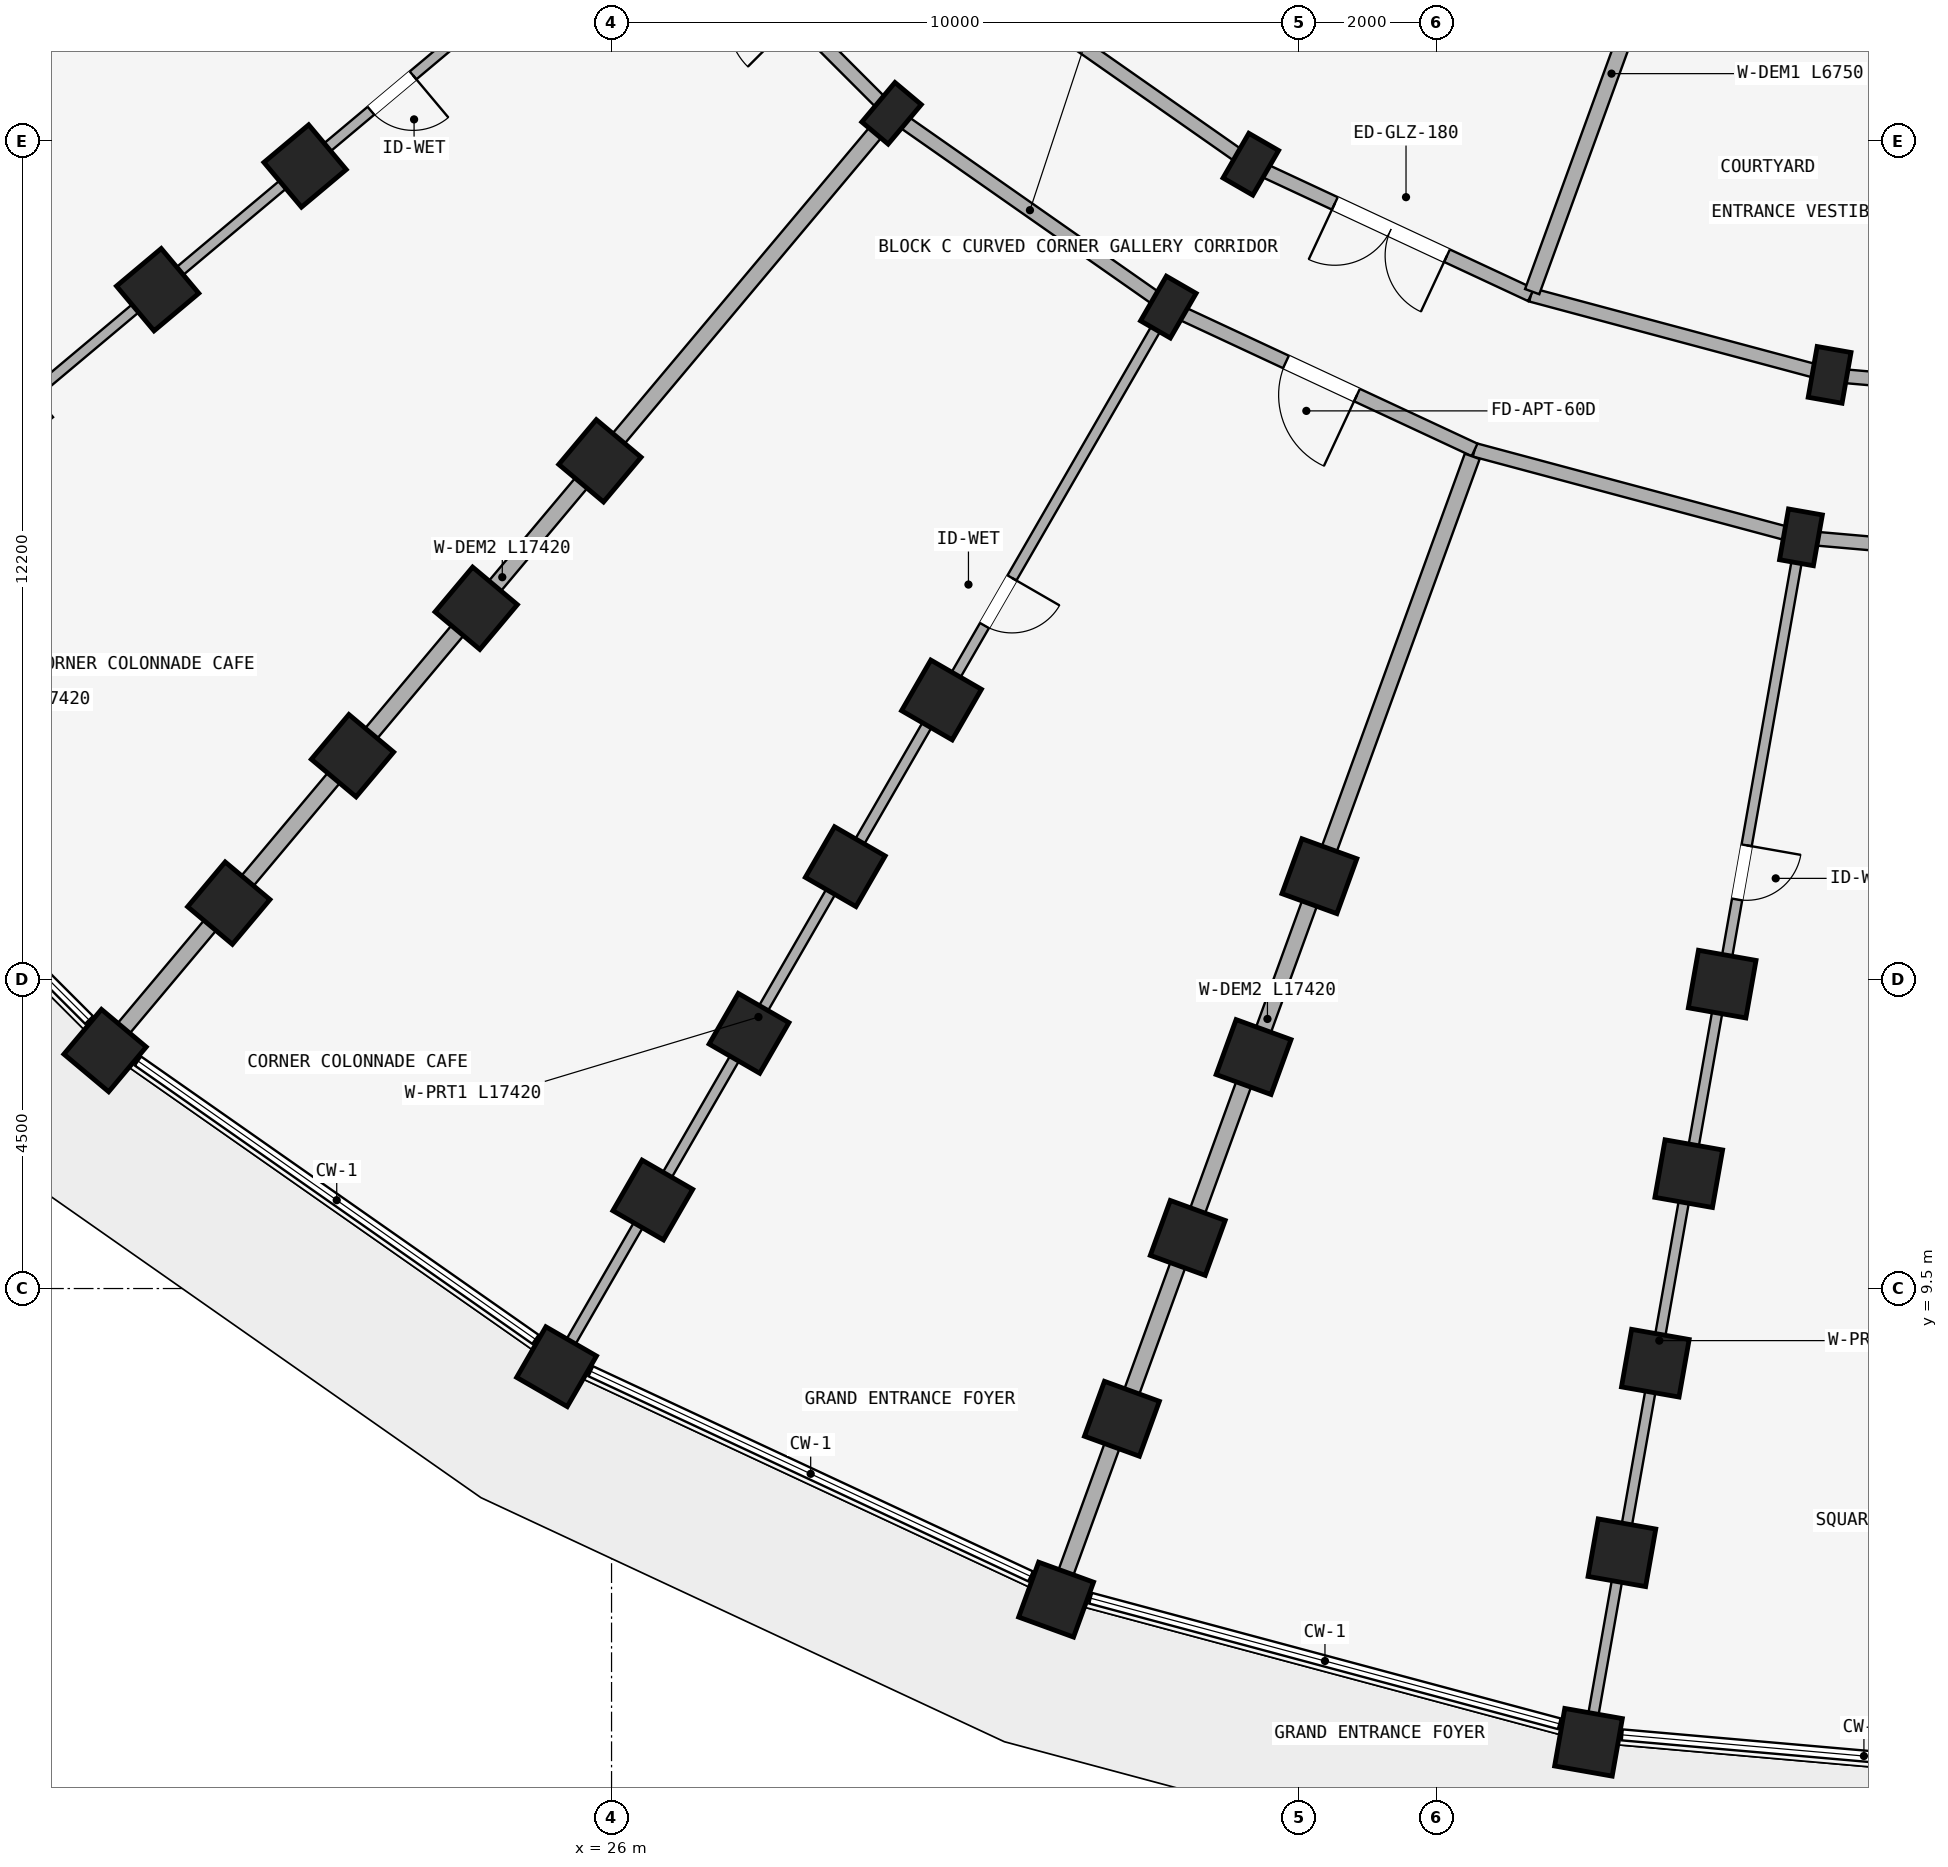
"""IFC4 building model, lengths in metres.
Left out: names, types, materials, properties, quantities, classifications, styles, units other than length and angle.
Written with IfcOpenShell. Run it as: python <this file> out.ifc"""

import sys

from ifc_helpers import new_model, si_unit, direction, frame, frame_2d, origin, origin_2d, place, context, subcontext, project, spatial, rectangle, extrude, element, fill, save


model = new_model("IFC4")
c1 = context("Model", 3, precision=1e-05, world=origin(), true_north=direction((0.0, 1.0)))
c2 = subcontext(c1, "Body", "Model", "MODEL_VIEW")
j1 = project(units=[si_unit("LENGTHUNIT", "METRE"), si_unit("PLANEANGLEUNIT", "RADIAN")], contexts=[c1])
p1 = place(None, origin())
s1 = spatial("IfcSite", under=j1, at=p1, CompositionType="ELEMENT")
p2 = place(p1, origin())
s2 = spatial("IfcBuilding", under=s1, at=p2, CompositionType="ELEMENT")
p3 = place(p2, origin())
s3 = spatial("IfcBuildingStorey", under=s2, at=p3, CompositionType="ELEMENT", Elevation=0.0)
for number, where, z_axis, x_axis in (
    (1, (43.72, 22.792, 0.0), (0.0, 0.0, 1.0), (-0.985, 0.174, 0.0)),
    (2, (43.303, 20.428, 0.0), (0.0, 0.0, 1.0), (-0.985, 0.174, 0.0)),
):
    element("IfcColumn", number, at=place(p3, frame(where, z_axis=z_axis, x_axis=x_axis)), inside=s3, PredefinedType="COLUMN", context=c2, shape_type="SweptSolid", body=[
        extrude(rectangle(XDim=0.5, YDim=0.75, at=origin_2d()), origin(), (0.0, 0.0, 1.0), 4.15),
    ])
for number, where, z_axis, x_axis in (
    (3, (42.157, 13.929, 0.0), (0.0, 0.0, 1.0), (-0.985, 0.174, 0.0)),
    (4, (41.671, 11.171, 0.0), (0.0, 0.0, 1.0), (-0.985, 0.174, 0.0)),
    (5, (41.185, 8.414, 0.0), (0.0, 0.0, 1.0), (-0.985, 0.174, 0.0)),
    (6, (40.698, 5.656, 0.0), (0.0, 0.0, 1.0), (-0.985, 0.174, 0.0)),
    (7, (40.212, 2.899, 0.0), (0.0, 0.0, 1.0), (-0.985, 0.174, 0.0)),
    (8, (36.298, 15.499, 0.0), (0.0, 0.0, 1.0), (-0.94, 0.342, 0.0)),
    (9, (35.34, 12.868, 0.0), (0.0, 0.0, 1.0), (-0.94, 0.342, 0.0)),
    (10, (34.382, 10.236, 0.0), (0.0, 0.0, 1.0), (-0.94, 0.342, 0.0)),
    (11, (33.425, 7.605, 0.0), (0.0, 0.0, 1.0), (-0.94, 0.342, 0.0)),
    (12, (32.467, 4.974, 0.0), (0.0, 0.0, 1.0), (-0.94, 0.342, 0.0)),
):
    element("IfcColumn", number, at=place(p3, frame(where, z_axis=z_axis, x_axis=x_axis)), inside=s3, PredefinedType="COLUMN", context=c2, shape_type="SweptSolid", body=[
        extrude(rectangle(XDim=0.85, YDim=0.85, at=origin_2d()), origin(), (0.0, 0.0, 1.0), 4.15),
    ])
for number, where, z_axis, x_axis in (
    (13, (35.3, 25.856, 0.0), (0.0, 0.0, 1.0), (-0.866, 0.5, 0.0)),
    (14, (34.1, 23.778, 0.0), (0.0, 0.0, 1.0), (-0.866, 0.5, 0.0)),
):
    element("IfcColumn", number, at=place(p3, frame(where, z_axis=z_axis, x_axis=x_axis)), inside=s3, PredefinedType="COLUMN", context=c2, shape_type="SweptSolid", body=[
        extrude(rectangle(XDim=0.5, YDim=0.75, at=origin_2d()), origin(), (0.0, 0.0, 1.0), 4.15),
    ])
for number, where, z_axis, x_axis in (
    (15, (30.8, 18.062, 0.0), (0.0, 0.0, 1.0), (-0.866, 0.5, 0.0)),
    (16, (29.4, 15.637, 0.0), (0.0, 0.0, 1.0), (-0.866, 0.5, 0.0)),
    (17, (28.0, 13.213, 0.0), (0.0, 0.0, 1.0), (-0.866, 0.5, 0.0)),
    (18, (26.6, 10.788, 0.0), (0.0, 0.0, 1.0), (-0.866, 0.5, 0.0)),
    (19, (25.2, 8.363, 0.0), (0.0, 0.0, 1.0), (-0.866, 0.5, 0.0)),
):
    element("IfcColumn", number, at=place(p3, frame(where, z_axis=z_axis, x_axis=x_axis)), inside=s3, PredefinedType="COLUMN", context=c2, shape_type="SweptSolid", body=[
        extrude(rectangle(XDim=0.85, YDim=0.85, at=origin_2d()), origin(), (0.0, 0.0, 1.0), 4.15),
    ])
p4 = place(p3, frame((30.073, 26.598, 0.0), z_axis=(0.0, 0.0, 1.0), x_axis=(-0.766044443119, 0.642787609687, 0.0)))
e20 = element("IfcColumn", 20, at=p4, inside=s3, PredefinedType="COLUMN", context=c2, shape_type="SweptSolid", body=[
    extrude(rectangle(XDim=0.5, YDim=0.75, at=origin_2d()), origin(), (0.0, 0.0, 1.0), 4.15),
])
for number, where, z_axis, x_axis in (
    (21, (25.831, 21.542, 0.0), (0.0, 0.0, 1.0), (-0.766, 0.643, 0.0)),
    (22, (24.031, 19.397, 0.0), (0.0, 0.0, 1.0), (-0.766, 0.643, 0.0)),
    (23, (22.231, 17.252, 0.0), (0.0, 0.0, 1.0), (-0.766, 0.643, 0.0)),
    (24, (20.432, 15.107, 0.0), (0.0, 0.0, 1.0), (-0.766, 0.643, 0.0)),
    (25, (18.632, 12.962, 0.0), (0.0, 0.0, 1.0), (-0.766, 0.643, 0.0)),
    (26, (21.542, 25.831, 0.0), (0.0, 0.0, 1.0), (-0.643, 0.766, 0.0)),
    (27, (19.397, 24.031, 0.0), (0.0, 0.0, 1.0), (-0.643, 0.766, 0.0)),
):
    element("IfcColumn", number, at=place(p3, frame(where, z_axis=z_axis, x_axis=x_axis)), inside=s3, PredefinedType="COLUMN", context=c2, shape_type="SweptSolid", body=[
        extrude(rectangle(XDim=0.85, YDim=0.85, at=origin_2d()), origin(), (0.0, 0.0, 1.0), 4.15),
    ])
p5 = place(p3, frame((48.2, 22.4, 0.0), z_axis=(0.0, 0.0, 1.0), x_axis=(-0.996191949488, 0.087187153726, 0.0)))
e28 = element("IfcWall", 28, at=p5, inside=s3, PredefinedType="STANDARD", context=c2, shape_type="SweptSolid", body=[
    extrude(rectangle(XDim=4.497, YDim=0.2, at=frame_2d((2.249, 0.0))), origin(), (0.0, 0.0, 1.0), 3.492),
])
p6 = place(p5, frame((1.729, 0.0, 0.0)))
e29 = element("IfcOpeningElement", 29, at=p6, cuts=e28, PredefinedType="OPENING", context=c2, shape_type="SweptSolid", body=[
    extrude(rectangle(XDim=1.04, YDim=2.15, at=frame_2d((0.52, 1.075))), frame((0.0, 0.11, 0.0), z_axis=(0.0, -1.0, 0.0), x_axis=(1.0, 0.0, 0.0)), (0.0, 0.0, 1.0), 0.22),
])
p7 = place(p3, frame((48.2, 20.0, 0.0), z_axis=(0.0, 0.0, 1.0), x_axis=(-0.996193663584, 0.087167566415, 0.0)))
e30 = element("IfcWall", 30, at=p7, inside=s3, PredefinedType="STANDARD", context=c2, shape_type="SweptSolid", body=[
    extrude(rectangle(XDim=4.916, YDim=0.2, at=frame_2d((2.458, 0.0))), origin(), (0.0, 0.0, 1.0), 3.492),
])
p8 = place(p7, frame((1.918, 0.0, 0.0)))
e31 = element("IfcOpeningElement", 31, at=p8, cuts=e30, PredefinedType="OPENING", context=c2, shape_type="SweptSolid", body=[
    extrude(rectangle(XDim=1.08, YDim=2.15, at=frame_2d((0.54, 1.075))), frame((0.0, 0.11, 0.0), z_axis=(0.0, -1.0, 0.0), x_axis=(1.0, 0.0, 0.0)), (0.0, 0.0, 1.0), 0.22),
])
p9 = place(p3, frame((43.72, 22.792, 0.0), z_axis=(0.0, 0.0, 1.0), x_axis=(-0.965934240054, 0.258787642463, 0.0)))
e32 = element("IfcWall", 32, at=p9, inside=s3, PredefinedType="STANDARD", context=c2, shape_type="SweptSolid", body=[
    extrude(rectangle(XDim=4.497, YDim=0.2, at=frame_2d((2.249, 0.0))), origin(), (0.0, 0.0, 1.0), 2.742),
])
p10 = place(p3, frame((43.303, 20.428, 0.0), z_axis=(0.0, 0.0, 1.0), x_axis=(-0.965930095386, 0.258803112091, 0.0)))
e33 = element("IfcWall", 33, at=p10, inside=s3, PredefinedType="STANDARD", context=c2, shape_type="SweptSolid", body=[
    extrude(rectangle(XDim=4.916, YDim=0.2, at=frame_2d((2.458, 0.0))), origin(), (0.0, 0.0, 1.0), 2.942),
])
p11 = place(p3, frame((39.376, 23.956, 0.0), z_axis=(0.0, 0.0, 1.0), x_axis=(-0.906307919131, 0.422617978463, 0.0)))
e34 = element("IfcWall", 34, at=p11, inside=s3, PredefinedType="STANDARD", context=c2, shape_type="SweptSolid", body=[
    extrude(rectangle(XDim=4.497, YDim=0.2, at=frame_2d((2.249, 0.0))), origin(), (0.0, 0.0, 1.0), 2.742),
])
p12 = place(p11, frame((1.349, 0.0, 0.0)))
e35 = element("IfcOpeningElement", 35, at=p12, cuts=e34, PredefinedType="OPENING", context=c2, shape_type="SweptSolid", body=[
    extrude(rectangle(XDim=1.8, YDim=2.2, at=frame_2d((0.9, 1.1))), frame((0.0, 0.11, 0.0), z_axis=(0.0, -1.0, 0.0), x_axis=(1.0, 0.0, 0.0)), (0.0, 0.0, 1.0), 0.22),
])
p13 = place(p3, frame((38.555, 21.701, 0.0), z_axis=(0.0, 0.0, 1.0), x_axis=(-0.906302381024, 0.422629854778, 0.0)))
e36 = element("IfcWall", 36, at=p13, inside=s3, PredefinedType="STANDARD", context=c2, shape_type="SweptSolid", body=[
    extrude(rectangle(XDim=4.915, YDim=0.2, at=frame_2d((2.458, 0.0))), origin(), (0.0, 0.0, 1.0), 2.942),
])
p14 = place(p13, frame((1.888, 0.0, 0.0)))
e37 = element("IfcOpeningElement", 37, at=p14, cuts=e36, PredefinedType="OPENING", context=c2, shape_type="SweptSolid", body=[
    extrude(rectangle(XDim=1.14, YDim=2.15, at=frame_2d((0.57, 1.075))), frame((0.0, 0.11, 0.0), z_axis=(0.0, -1.0, 0.0), x_axis=(1.0, 0.0, 0.0)), (0.0, 0.0, 1.0), 0.22),
])
p15 = place(p3, frame((35.3, 25.856, 0.0), z_axis=(0.0, 0.0, 1.0), x_axis=(-0.819155404658, 0.573571637217, 0.0)))
e38 = element("IfcWall", 38, at=p15, inside=s3, PredefinedType="STANDARD", context=c2, shape_type="SweptSolid", body=[
    extrude(rectangle(XDim=4.497, YDim=0.2, at=frame_2d((2.249, 0.0))), origin(), (0.0, 0.0, 1.0), 3.492),
])
p16 = place(p3, frame((34.1, 23.778, 0.0), z_axis=(0.0, 0.0, 1.0), x_axis=(-0.819140911474, 0.573592335331, 0.0)))
e39 = element("IfcWall", 39, at=p16, inside=s3, PredefinedType="STANDARD", context=c2, shape_type="SweptSolid", body=[
    extrude(rectangle(XDim=4.916, YDim=0.2, at=frame_2d((2.458, 0.0))), origin(), (0.0, 0.0, 1.0), 3.492),
])
p17 = place(p3, frame((30.073, 26.598, 0.0), z_axis=(0.0, 0.0, 1.0), x_axis=(-0.707106781187, 0.707106781187, 0.0)))
e40 = element("IfcWall", 40, at=p17, inside=s3, PredefinedType="STANDARD", context=c2, shape_type="SweptSolid", body=[
    extrude(rectangle(XDim=4.916, YDim=0.2, at=frame_2d((2.458, 0.0))), origin(), (0.0, 0.0, 1.0), 3.492),
])
p18 = place(p17, frame((1.958, 0.0, 0.0)))
e41 = element("IfcOpeningElement", 41, at=p18, cuts=e40, PredefinedType="OPENING", context=c2, shape_type="SweptSolid", body=[
    extrude(rectangle(XDim=1.0, YDim=2.15, at=frame_2d((0.5, 1.075))), frame((0.0, 0.11, 0.0), z_axis=(0.0, -1.0, 0.0), x_axis=(1.0, 0.0, 0.0)), (0.0, 0.0, 1.0), 0.22),
])
p19 = place(p3, frame((43.286, 20.33, 0.0), z_axis=(0.0, 0.0, 1.0), x_axis=(-0.173646216546, -0.984808098809, 0.0)))
e42 = element("IfcWall", 42, at=p19, inside=s3, PredefinedType="PARTITIONING", context=c2, shape_type="SweptSolid", body=[
    extrude(rectangle(XDim=17.42, YDim=0.15, at=frame_2d((8.71, 0.0))), origin(), (0.0, 0.0, 1.0), 2.942),
])
p20 = place(p19, frame((4.45, 0.0, 0.0)))
e43 = element("IfcOpeningElement", 43, at=p20, cuts=e42, PredefinedType="OPENING", context=c2, shape_type="SweptSolid", body=[
    extrude(rectangle(XDim=0.8, YDim=2.1, at=frame_2d((0.4, 1.05))), frame((0.0, 0.085, 0.0), z_axis=(0.0, -1.0, 0.0), x_axis=(1.0, 0.0, 0.0)), (0.0, 0.0, 1.0), 0.17),
])
p21 = place(p3, frame((41.702, 30.346, 0.0), z_axis=(0.0, 0.0, 1.0), x_axis=(-0.342010221662, -0.939696231917, 0.0)))
e44 = element("IfcWall", 44, at=p21, inside=s3, PredefinedType="STANDARD", context=c2, shape_type="SweptSolid", body=[
    extrude(rectangle(XDim=6.75, YDim=0.22, at=frame_2d((3.375, 0.0))), origin(), (0.0, 0.0, 1.0), 2.742),
])
p22 = place(p3, frame((38.521, 21.607, 0.0), z_axis=(0.0, 0.0, 1.0), x_axis=(-0.342022120477, -0.939691901159, 0.0)))
e45 = element("IfcWall", 45, at=p22, inside=s3, PredefinedType="STANDARD", context=c2, shape_type="SweptSolid", body=[
    extrude(rectangle(XDim=17.42, YDim=0.23, at=frame_2d((8.71, 0.0))), origin(), (0.0, 0.0, 1.0), 3.492),
])
p23 = place(p3, frame((34.05, 23.691, 0.0), z_axis=(0.0, 0.0, 1.0), x_axis=(-0.499997843263, -0.866026648973, 0.0)))
e46 = element("IfcWall", 46, at=p23, inside=s3, PredefinedType="PARTITIONING", context=c2, shape_type="SweptSolid", body=[
    extrude(rectangle(XDim=17.42, YDim=0.15, at=frame_2d((8.71, 0.0))), origin(), (0.0, 0.0, 1.0), 2.942),
])
p24 = place(p23, frame((4.45, 0.0, 0.0)))
e47 = element("IfcOpeningElement", 47, at=p24, cuts=e46, PredefinedType="OPENING", context=c2, shape_type="SweptSolid", body=[
    extrude(rectangle(XDim=0.8, YDim=2.1, at=frame_2d((0.4, 1.05))), frame((0.0, 0.085, 0.0), z_axis=(0.0, -1.0, 0.0), x_axis=(1.0, 0.0, 0.0)), (0.0, 0.0, 1.0), 0.17),
])
p25 = place(p3, frame((30.009, 26.521, 0.0), z_axis=(0.0, 0.0, 1.0), x_axis=(-0.642784757967, -0.766046835987, 0.0)))
e48 = element("IfcWall", 48, at=p25, inside=s3, PredefinedType="STANDARD", context=c2, shape_type="SweptSolid", body=[
    extrude(rectangle(XDim=17.42, YDim=0.23, at=frame_2d((8.71, 0.0))), origin(), (0.0, 0.0, 1.0), 3.492),
])
p26 = place(p3, frame((26.521, 30.009, 0.0), z_axis=(0.0, 0.0, 1.0), x_axis=(-0.766046835987, -0.642784757967, 0.0)))
e49 = element("IfcWall", 49, at=p26, inside=s3, PredefinedType="PARTITIONING", context=c2, shape_type="SweptSolid", body=[
    extrude(rectangle(XDim=17.42, YDim=0.15, at=frame_2d((8.71, 0.0))), origin(), (0.0, 0.0, 1.0), 3.492),
])
p27 = place(p26, frame((4.45, 0.0, 0.0)))
e50 = element("IfcOpeningElement", 50, at=p27, cuts=e49, PredefinedType="OPENING", context=c2, shape_type="SweptSolid", body=[
    extrude(rectangle(XDim=0.8, YDim=2.1, at=frame_2d((0.4, 1.05))), frame((0.0, 0.085, 0.0), z_axis=(0.0, -1.0, 0.0), x_axis=(1.0, 0.0, 0.0)), (0.0, 0.0, 1.0), 0.17),
])
p28 = place(p3, frame((23.691, 34.05, 0.0), z_axis=(0.0, 0.0, 1.0), x_axis=(-0.866026648973, -0.499997843263, 0.0)))
e51 = element("IfcWall", 51, at=p28, inside=s3, PredefinedType="STANDARD", context=c2, shape_type="SweptSolid", body=[
    extrude(rectangle(XDim=17.42, YDim=0.23, at=frame_2d((8.71, 0.0))), origin(), (0.0, 0.0, 1.0), 3.492),
])
p29 = place(p20, frame((0.8, 0.0, 0.0), z_axis=(0.0, 0.0, 1.0), x_axis=(-1.0, 0.0, 0.0)))
e52 = element("IfcDoor", 52, at=p29, inside=s3, OperationType="SINGLE_SWING_RIGHT", PredefinedType="DOOR", context=c2, shape_type="SweptSolid", body=[
    extrude(rectangle(XDim=0.8, YDim=2.1, at=frame_2d((0.4, 1.05))), frame((0.0, 0.025, 0.0), z_axis=(0.0, -1.0, 0.0), x_axis=(1.0, 0.0, 0.0)), (0.0, 0.0, 1.0), 0.05),
])
fill(e43, e52)
p30 = place(p24, origin())
e53 = element("IfcDoor", 53, at=p30, inside=s3, OperationType="SINGLE_SWING_LEFT", PredefinedType="DOOR", context=c2, shape_type="SweptSolid", body=[
    extrude(rectangle(XDim=0.8, YDim=2.1, at=frame_2d((0.4, 1.05))), frame((0.0, 0.025, 0.0), z_axis=(0.0, -1.0, 0.0), x_axis=(1.0, 0.0, 0.0)), (0.0, 0.0, 1.0), 0.05),
])
fill(e47, e53)
p31 = place(p27, frame((0.8, 0.0, 0.0), z_axis=(0.0, 0.0, 1.0), x_axis=(-1.0, 0.0, 0.0)))
e54 = element("IfcDoor", 54, at=p31, inside=s3, OperationType="SINGLE_SWING_RIGHT", PredefinedType="DOOR", context=c2, shape_type="SweptSolid", body=[
    extrude(rectangle(XDim=0.8, YDim=2.1, at=frame_2d((0.4, 1.05))), frame((0.0, 0.025, 0.0), z_axis=(0.0, -1.0, 0.0), x_axis=(1.0, 0.0, 0.0)), (0.0, 0.0, 1.0), 0.05),
])
fill(e50, e54)
p32 = place(p14, frame((1.14, 0.0, 0.0), z_axis=(0.0, 0.0, 1.0), x_axis=(-1.0, 0.0, 0.0)))
e55 = element("IfcDoor", 55, at=p32, inside=s3, OperationType="SINGLE_SWING_RIGHT", PredefinedType="DOOR", context=c2, shape_type="SweptSolid", body=[
    extrude(rectangle(XDim=1.14, YDim=2.15, at=frame_2d((0.57, 1.075))), frame((0.0, 0.025, 0.0), z_axis=(0.0, -1.0, 0.0), x_axis=(1.0, 0.0, 0.0)), (0.0, 0.0, 1.0), 0.05),
])
fill(e37, e55)
p33 = place(p12, origin())
e56 = element("IfcDoor", 56, at=p33, inside=s3, OperationType="DOUBLE_DOOR_SINGLE_SWING", PredefinedType="DOOR", context=c2, shape_type="SweptSolid", body=[
    extrude(rectangle(XDim=1.8, YDim=2.2, at=frame_2d((0.9, 1.1))), frame((0.0, 0.025, 0.0), z_axis=(0.0, -1.0, 0.0), x_axis=(1.0, 0.0, 0.0)), (0.0, 0.0, 1.0), 0.05),
])
fill(e35, e56)
save(model, sys.argv[1])
